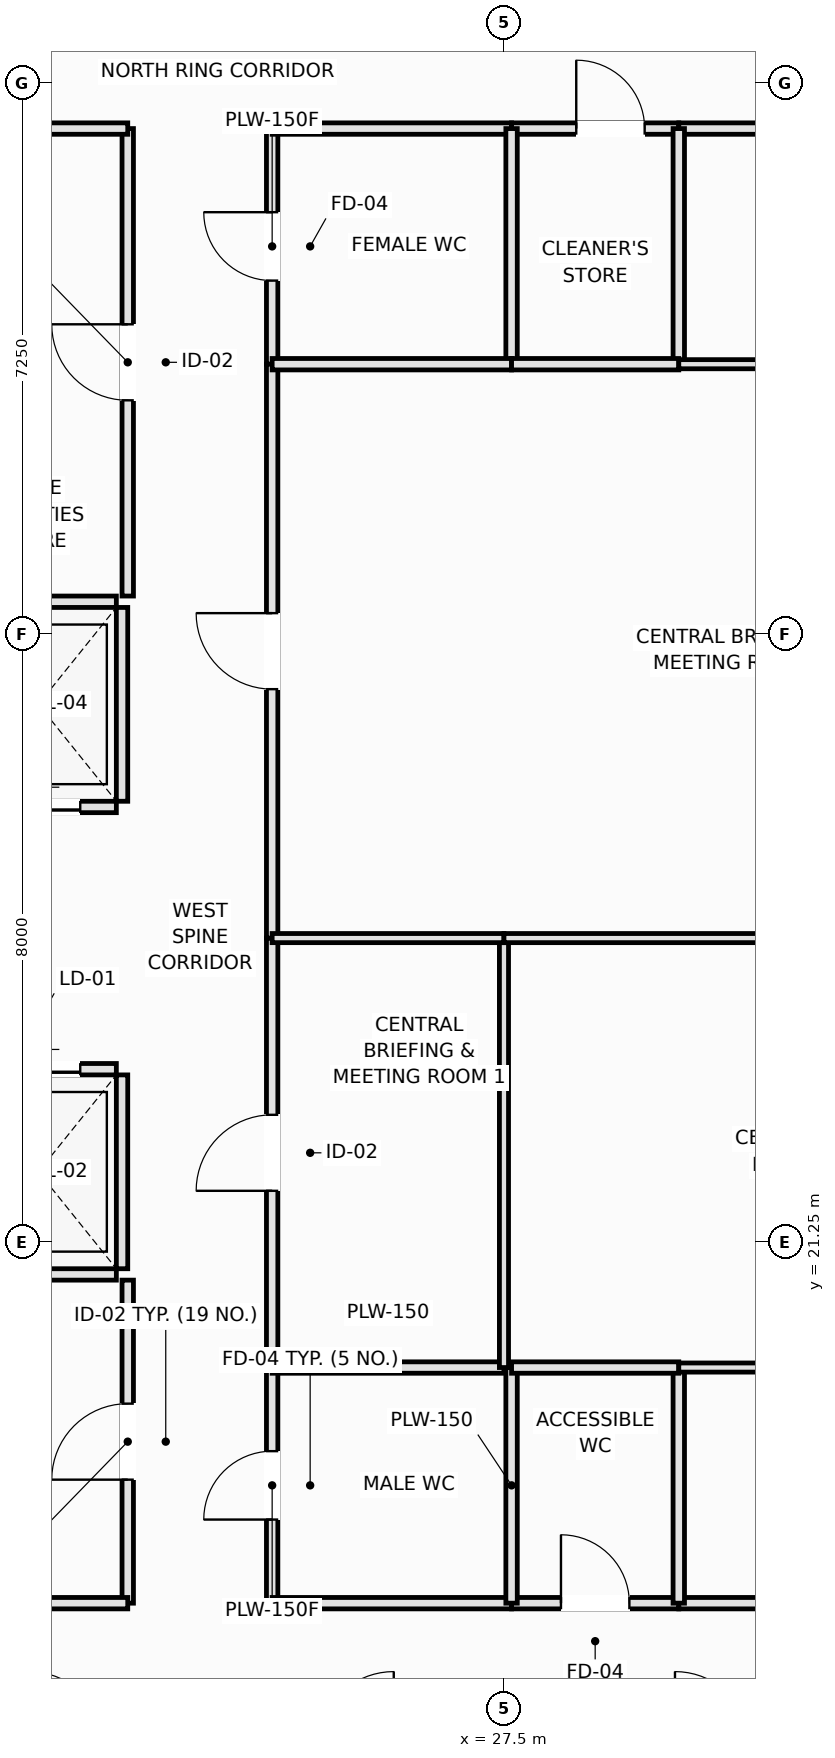
"""IFC4 building model, lengths in metres.
Left out: names, types, materials, properties, quantities, classifications, styles, units other than length and angle.
Written with IfcOpenShell. Run it as: python <this file> out.ifc"""

import sys

from ifc_helpers import new_model, si_unit, direction, frame, frame_2d, origin, place, context, subcontext, project, spatial, rectangle, extrude, element, fill, save


model = new_model("IFC4")
c1 = context("Model", 3, precision=1e-05, world=origin(), true_north=direction((0.0, 1.0)))
c2 = subcontext(c1, "Body", "Model", "MODEL_VIEW")
j1 = project(units=[si_unit("LENGTHUNIT", "METRE"), si_unit("PLANEANGLEUNIT", "RADIAN")], contexts=[c1])
p1 = place(None, origin())
s1 = spatial("IfcSite", under=j1, at=p1, CompositionType="ELEMENT")
p2 = place(p1, origin())
s2 = spatial("IfcBuilding", under=s1, at=p2, CompositionType="ELEMENT")
p3 = place(p2, frame((0.0, 0.0, 64.65)))
s3 = spatial("IfcBuildingStorey", under=s2, at=p3, CompositionType="ELEMENT", Elevation=64.65)
p4 = place(p3, frame((20.35, 20.825, 0.0), z_axis=(0.0, 0.0, 1.0), x_axis=(1.0, 0.0, 0.0)))
e1 = element("IfcWall", 1, at=p4, inside=s3, PredefinedType="PARTITIONING", context=c2, shape_type="SweptSolid", body=[
    extrude(rectangle(XDim=2.05, YDim=0.15, at=frame_2d((1.025, 0.0))), origin(), (0.0, 0.0, 1.0), 3.37),
])
p5 = place(p3, frame((20.35, 23.525, 0.0), z_axis=(0.0, 0.0, 1.0), x_axis=(1.0, 0.0, 0.0)))
e2 = element("IfcWall", 2, at=p5, inside=s3, PredefinedType="PARTITIONING", context=c2, shape_type="SweptSolid", body=[
    extrude(rectangle(XDim=2.05, YDim=0.15, at=frame_2d((1.025, 0.0))), origin(), (0.0, 0.0, 1.0), 3.37),
])
p6 = place(p5, frame((0.475, 0.0, 0.0)))
e3 = element("IfcOpeningElement", 3, at=p6, cuts=e2, PredefinedType="OPENING", context=c2, shape_type="SweptSolid", body=[
    extrude(rectangle(XDim=1.1, YDim=2.2, at=frame_2d((0.55, 1.1))), frame((0.0, 0.085, 0.0), z_axis=(0.0, -1.0, 0.0), x_axis=(1.0, 0.0, 0.0)), (0.0, 0.0, 1.0), 0.17),
])
p7 = place(p3, frame((22.475, 20.9, 0.0), z_axis=(0.0, 0.0, 1.0), x_axis=(0.0, 1.0, 0.0)))
e4 = element("IfcWall", 4, at=p7, inside=s3, PredefinedType="PARTITIONING", context=c2, shape_type="SweptSolid", body=[
    extrude(rectangle(XDim=2.55, YDim=0.15, at=frame_2d((1.275, 0.0))), origin(), (0.0, 0.0, 1.0), 3.37),
])
p8 = place(p3, frame((20.35, 26.975, 0.0), z_axis=(0.0, 0.0, 1.0), x_axis=(1.0, 0.0, 0.0)))
e5 = element("IfcWall", 5, at=p8, inside=s3, PredefinedType="PARTITIONING", context=c2, shape_type="SweptSolid", body=[
    extrude(rectangle(XDim=2.05, YDim=0.15, at=frame_2d((1.025, 0.0))), origin(), (0.0, 0.0, 1.0), 3.37),
])
p9 = place(p8, frame((0.475, 0.0, 0.0)))
e6 = element("IfcOpeningElement", 6, at=p9, cuts=e5, PredefinedType="OPENING", context=c2, shape_type="SweptSolid", body=[
    extrude(rectangle(XDim=1.1, YDim=2.2, at=frame_2d((0.55, 1.1))), frame((0.0, 0.085, 0.0), z_axis=(0.0, -1.0, 0.0), x_axis=(1.0, 0.0, 0.0)), (0.0, 0.0, 1.0), 0.17),
])
p10 = place(p3, frame((20.35, 29.675, 0.0), z_axis=(0.0, 0.0, 1.0), x_axis=(1.0, 0.0, 0.0)))
e7 = element("IfcWall", 7, at=p10, inside=s3, PredefinedType="PARTITIONING", context=c2, shape_type="SweptSolid", body=[
    extrude(rectangle(XDim=2.05, YDim=0.15, at=frame_2d((1.025, 0.0))), origin(), (0.0, 0.0, 1.0), 3.37),
])
p11 = place(p3, frame((22.475, 27.05, 0.0), z_axis=(0.0, 0.0, 1.0), x_axis=(0.0, 1.0, 0.0)))
e8 = element("IfcWall", 8, at=p11, inside=s3, PredefinedType="PARTITIONING", context=c2, shape_type="SweptSolid", body=[
    extrude(rectangle(XDim=2.55, YDim=0.15, at=frame_2d((1.275, 0.0))), origin(), (0.0, 0.0, 1.0), 3.37),
])
p12 = place(p3, frame((22.55, 16.5, 0.0), z_axis=(0.0, 0.0, 1.0), x_axis=(0.0, 1.0, 0.0)))
e9 = element("IfcWall", 9, at=p12, inside=s3, PredefinedType="PARTITIONING", context=c2, shape_type="SweptSolid", body=[
    extrude(rectangle(XDim=4.25, YDim=0.15, at=frame_2d((2.125, 0.0))), origin(), (0.0, 0.0, 1.0), 3.01),
])
p13 = place(p12, frame((1.625, 0.0, 0.0)))
e10 = element("IfcOpeningElement", 10, at=p13, cuts=e9, PredefinedType="OPENING", context=c2, shape_type="SweptSolid", body=[
    extrude(rectangle(XDim=1.0, YDim=2.15, at=frame_2d((0.5, 1.075))), frame((0.0, 0.085, 0.0), z_axis=(0.0, -1.0, 0.0), x_axis=(1.0, 0.0, 0.0)), (0.0, 0.0, 1.0), 0.17),
])
p14 = place(p3, frame((22.55, 29.75, 0.0), z_axis=(0.0, 0.0, 1.0), x_axis=(0.0, 1.0, 0.0)))
e11 = element("IfcWall", 11, at=p14, inside=s3, PredefinedType="PARTITIONING", context=c2, shape_type="SweptSolid", body=[
    extrude(rectangle(XDim=6.15, YDim=0.15, at=frame_2d((3.075, 0.0))), origin(), (0.0, 0.0, 1.0), 3.01),
])
p15 = place(p14, frame((2.575, 0.0, 0.0)))
e12 = element("IfcOpeningElement", 12, at=p15, cuts=e11, PredefinedType="OPENING", context=c2, shape_type="SweptSolid", body=[
    extrude(rectangle(XDim=1.0, YDim=2.15, at=frame_2d((0.5, 1.075))), frame((0.0, 0.085, 0.0), z_axis=(0.0, -1.0, 0.0), x_axis=(1.0, 0.0, 0.0)), (0.0, 0.0, 1.0), 0.17),
])
p16 = place(p3, frame((24.45, 16.5, 0.0), z_axis=(0.0, 0.0, 1.0), x_axis=(0.0, 1.0, 0.0)))
e13 = element("IfcWall", 13, at=p16, inside=s3, PredefinedType="PLUMBINGWALL", context=c2, shape_type="SweptSolid", body=[
    extrude(rectangle(XDim=3.1, YDim=0.15, at=frame_2d((1.55, 0.0))), origin(), (0.0, 0.0, 1.0), 3.37),
])
p17 = place(p16, frame((1.1, 0.0, 0.0)))
e14 = element("IfcOpeningElement", 14, at=p17, cuts=e13, PredefinedType="OPENING", context=c2, shape_type="SweptSolid", body=[
    extrude(rectangle(XDim=0.9, YDim=2.1, at=frame_2d((0.45, 1.05))), frame((0.0, 0.085, 0.0), z_axis=(0.0, -1.0, 0.0), x_axis=(1.0, 0.0, 0.0)), (0.0, 0.0, 1.0), 0.17),
])
p18 = place(p3, frame((24.45, 32.8, 0.0), z_axis=(0.0, 0.0, 1.0), x_axis=(0.0, 1.0, 0.0)))
e15 = element("IfcWall", 15, at=p18, inside=s3, PredefinedType="PLUMBINGWALL", context=c2, shape_type="SweptSolid", body=[
    extrude(rectangle(XDim=3.1, YDim=0.15, at=frame_2d((1.55, 0.0))), origin(), (0.0, 0.0, 1.0), 3.37),
])
p19 = place(p18, frame((1.1, 0.0, 0.0)))
e16 = element("IfcOpeningElement", 16, at=p19, cuts=e15, PredefinedType="OPENING", context=c2, shape_type="SweptSolid", body=[
    extrude(rectangle(XDim=0.9, YDim=2.1, at=frame_2d((0.45, 1.05))), frame((0.0, 0.085, 0.0), z_axis=(0.0, -1.0, 0.0), x_axis=(1.0, 0.0, 0.0)), (0.0, 0.0, 1.0), 0.17),
])
p20 = place(p3, frame((24.45, 19.6, 0.0), z_axis=(0.0, 0.0, 1.0), x_axis=(0.0, 1.0, 0.0)))
e17 = element("IfcWall", 17, at=p20, inside=s3, PredefinedType="PARTITIONING", context=c2, shape_type="SweptSolid", body=[
    extrude(rectangle(XDim=5.65, YDim=0.15, at=frame_2d((2.825, 0.0))), origin(), (0.0, 0.0, 1.0), 3.37),
])
p21 = place(p20, frame((2.325, 0.0, 0.0)))
e18 = element("IfcOpeningElement", 18, at=p21, cuts=e17, PredefinedType="OPENING", context=c2, shape_type="SweptSolid", body=[
    extrude(rectangle(XDim=1.0, YDim=2.15, at=frame_2d((0.5, 1.075))), frame((0.0, 0.085, 0.0), z_axis=(0.0, -1.0, 0.0), x_axis=(1.0, 0.0, 0.0)), (0.0, 0.0, 1.0), 0.17),
])
p22 = place(p3, frame((24.45, 25.25, 0.0), z_axis=(0.0, 0.0, 1.0), x_axis=(0.0, 1.0, 0.0)))
e19 = element("IfcWall", 19, at=p22, inside=s3, PredefinedType="PARTITIONING", context=c2, shape_type="SweptSolid", body=[
    extrude(rectangle(XDim=7.55, YDim=0.15, at=frame_2d((3.775, 0.0))), origin(), (0.0, 0.0, 1.0), 3.37),
])
p23 = place(p22, frame((3.275, 0.0, 0.0)))
e20 = element("IfcOpeningElement", 20, at=p23, cuts=e19, PredefinedType="OPENING", context=c2, shape_type="SweptSolid", body=[
    extrude(rectangle(XDim=1.0, YDim=2.15, at=frame_2d((0.5, 1.075))), frame((0.0, 0.085, 0.0), z_axis=(0.0, -1.0, 0.0), x_axis=(1.0, 0.0, 0.0)), (0.0, 0.0, 1.0), 0.17),
])
p24 = place(p3, frame((19.9, 16.5, 0.0), z_axis=(0.0, 0.0, 1.0), x_axis=(1.0, 0.0, 0.0)))
e21 = element("IfcWall", 21, at=p24, inside=s3, PredefinedType="PARTITIONING", context=c2, shape_type="SweptSolid", body=[
    extrude(rectangle(XDim=2.65, YDim=0.15, at=frame_2d((1.325, 0.0))), origin(), (0.0, 0.0, 1.0), 3.37),
])
p25 = place(p3, frame((24.45, 16.5, 0.0), z_axis=(0.0, 0.0, 1.0), x_axis=(1.0, 0.0, 0.0)))
e22 = element("IfcWall", 22, at=p25, inside=s3, PredefinedType="PLUMBINGWALL", context=c2, shape_type="SweptSolid", body=[
    extrude(rectangle(XDim=3.15, YDim=0.15, at=frame_2d((1.575, 0.0))), origin(), (0.0, 0.0, 1.0), 3.37),
])
p26 = place(p3, frame((27.6, 16.5, 0.0), z_axis=(0.0, 0.0, 1.0), x_axis=(1.0, 0.0, 0.0)))
e23 = element("IfcWall", 23, at=p26, inside=s3, PredefinedType="PLUMBINGWALL", context=c2, shape_type="SweptSolid", body=[
    extrude(rectangle(XDim=2.2, YDim=0.15, at=frame_2d((1.1, 0.0))), origin(), (0.0, 0.0, 1.0), 3.37),
])
p27 = place(p26, frame((0.65, 0.0, 0.0)))
e24 = element("IfcOpeningElement", 24, at=p27, cuts=e23, PredefinedType="OPENING", context=c2, shape_type="SweptSolid", body=[
    extrude(rectangle(XDim=0.9, YDim=2.1, at=frame_2d((0.45, 1.05))), frame((0.0, 0.085, 0.0), z_axis=(0.0, -1.0, 0.0), x_axis=(1.0, 0.0, 0.0)), (0.0, 0.0, 1.0), 0.17),
])
p28 = place(p3, frame((29.8, 16.5, 0.0), z_axis=(0.0, 0.0, 1.0), x_axis=(1.0, 0.0, 0.0)))
e25 = element("IfcWall", 25, at=p28, inside=s3, PredefinedType="PARTITIONING", context=c2, shape_type="SweptSolid", body=[
    extrude(rectangle(XDim=6.5, YDim=0.15, at=frame_2d((3.25, 0.0))), origin(), (0.0, 0.0, 1.0), 3.37),
])
p29 = place(p3, frame((19.9, 35.9, 0.0), z_axis=(0.0, 0.0, 1.0), x_axis=(1.0, 0.0, 0.0)))
e26 = element("IfcWall", 26, at=p29, inside=s3, PredefinedType="PARTITIONING", context=c2, shape_type="SweptSolid", body=[
    extrude(rectangle(XDim=2.65, YDim=0.15, at=frame_2d((1.325, 0.0))), origin(), (0.0, 0.0, 1.0), 3.37),
])
p30 = place(p3, frame((24.45, 35.9, 0.0), z_axis=(0.0, 0.0, 1.0), x_axis=(1.0, 0.0, 0.0)))
e27 = element("IfcWall", 27, at=p30, inside=s3, PredefinedType="PLUMBINGWALL", context=c2, shape_type="SweptSolid", body=[
    extrude(rectangle(XDim=3.15, YDim=0.15, at=frame_2d((1.575, 0.0))), origin(), (0.0, 0.0, 1.0), 3.37),
])
p31 = place(p3, frame((27.6, 35.9, 0.0), z_axis=(0.0, 0.0, 1.0), x_axis=(1.0, 0.0, 0.0)))
e28 = element("IfcWall", 28, at=p31, inside=s3, PredefinedType="PLUMBINGWALL", context=c2, shape_type="SweptSolid", body=[
    extrude(rectangle(XDim=2.2, YDim=0.15, at=frame_2d((1.1, 0.0))), origin(), (0.0, 0.0, 1.0), 3.37),
])
p32 = place(p31, frame((0.851, 0.0, 0.0)))
e29 = element("IfcOpeningElement", 29, at=p32, cuts=e28, PredefinedType="OPENING", context=c2, shape_type="SweptSolid", body=[
    extrude(rectangle(XDim=0.9, YDim=2.1, at=frame_2d((0.45, 1.05))), frame((0.0, 0.085, 0.0), z_axis=(0.0, -1.0, 0.0), x_axis=(1.0, 0.0, 0.0)), (0.0, 0.0, 1.0), 0.17),
])
p33 = place(p3, frame((29.8, 35.9, 0.0), z_axis=(0.0, 0.0, 1.0), x_axis=(1.0, 0.0, 0.0)))
e30 = element("IfcWall", 30, at=p33, inside=s3, PredefinedType="PARTITIONING", context=c2, shape_type="SweptSolid", body=[
    extrude(rectangle(XDim=6.5, YDim=0.15, at=frame_2d((3.25, 0.0))), origin(), (0.0, 0.0, 1.0), 3.37),
])
p34 = place(p3, frame((27.6, 16.5, 0.0), z_axis=(0.0, 0.0, 1.0), x_axis=(0.0, 1.0, 0.0)))
e31 = element("IfcWall", 31, at=p34, inside=s3, PredefinedType="PLUMBINGWALL", context=c2, shape_type="SweptSolid", body=[
    extrude(rectangle(XDim=3.1, YDim=0.15, at=frame_2d((1.55, 0.0))), origin(), (0.0, 0.0, 1.0), 3.37),
])
p35 = place(p3, frame((24.45, 19.6, 0.0), z_axis=(0.0, 0.0, 1.0), x_axis=(1.0, 0.0, 0.0)))
e32 = element("IfcWall", 32, at=p35, inside=s3, PredefinedType="PLUMBINGWALL", context=c2, shape_type="SweptSolid", body=[
    extrude(rectangle(XDim=3.05, YDim=0.15, at=frame_2d((1.525, 0.0))), origin(), (0.0, 0.0, 1.0), 3.37),
])
p36 = place(p3, frame((27.6, 32.8, 0.0), z_axis=(0.0, 0.0, 1.0), x_axis=(0.0, 1.0, 0.0)))
e33 = element("IfcWall", 33, at=p36, inside=s3, PredefinedType="PLUMBINGWALL", context=c2, shape_type="SweptSolid", body=[
    extrude(rectangle(XDim=3.1, YDim=0.15, at=frame_2d((1.55, 0.0))), origin(), (0.0, 0.0, 1.0), 3.37),
])
p37 = place(p3, frame((24.45, 32.8, 0.0), z_axis=(0.0, 0.0, 1.0), x_axis=(1.0, 0.0, 0.0)))
e34 = element("IfcWall", 34, at=p37, inside=s3, PredefinedType="PLUMBINGWALL", context=c2, shape_type="SweptSolid", body=[
    extrude(rectangle(XDim=3.15, YDim=0.15, at=frame_2d((1.575, 0.0))), origin(), (0.0, 0.0, 1.0), 3.37),
])
p38 = place(p3, frame((29.8, 16.5, 0.0), z_axis=(0.0, 0.0, 1.0), x_axis=(0.0, 1.0, 0.0)))
e35 = element("IfcWall", 35, at=p38, inside=s3, PredefinedType="PLUMBINGWALL", context=c2, shape_type="SweptSolid", body=[
    extrude(rectangle(XDim=3.1, YDim=0.15, at=frame_2d((1.55, 0.0))), origin(), (0.0, 0.0, 1.0), 3.37),
])
p39 = place(p3, frame((27.6, 19.6, 0.0), z_axis=(0.0, 0.0, 1.0), x_axis=(1.0, 0.0, 0.0)))
e36 = element("IfcWall", 36, at=p39, inside=s3, PredefinedType="PLUMBINGWALL", context=c2, shape_type="SweptSolid", body=[
    extrude(rectangle(XDim=2.2, YDim=0.15, at=frame_2d((1.1, 0.0))), origin(), (0.0, 0.0, 1.0), 3.37),
])
p40 = place(p3, frame((29.8, 32.8, 0.0), z_axis=(0.0, 0.0, 1.0), x_axis=(0.0, 1.0, 0.0)))
e37 = element("IfcWall", 37, at=p40, inside=s3, PredefinedType="PLUMBINGWALL", context=c2, shape_type="SweptSolid", body=[
    extrude(rectangle(XDim=3.1, YDim=0.15, at=frame_2d((1.55, 0.0))), origin(), (0.0, 0.0, 1.0), 3.37),
])
p41 = place(p3, frame((27.6, 32.8, 0.0), z_axis=(0.0, 0.0, 1.0), x_axis=(1.0, 0.0, 0.0)))
e38 = element("IfcWall", 38, at=p41, inside=s3, PredefinedType="PLUMBINGWALL", context=c2, shape_type="SweptSolid", body=[
    extrude(rectangle(XDim=2.2, YDim=0.15, at=frame_2d((1.1, 0.0))), origin(), (0.0, 0.0, 1.0), 3.37),
])
for number, where, z_axis, x_axis in (
    (39, (29.8, 19.6, 0.0), (0.0, 0.0, 1.0), (1.0, 0.0, 0.0)),
    (40, (29.8, 32.8, 0.0), (0.0, 0.0, 1.0), (1.0, 0.0, 0.0)),
):
    element("IfcWall", number, at=place(p3, frame(where, z_axis=z_axis, x_axis=x_axis)), inside=s3, PredefinedType="PARTITIONING", context=c2, shape_type="SweptSolid", body=[
        extrude(rectangle(XDim=6.5, YDim=0.12, at=frame_2d((3.25, 0.0))), origin(), (0.0, 0.0, 1.0), 3.37),
    ])
p42 = place(p3, frame((27.5, 19.6, 0.0), z_axis=(0.0, 0.0, 1.0), x_axis=(0.0, 1.0, 0.0)))
e41 = element("IfcWall", 41, at=p42, inside=s3, PredefinedType="PARTITIONING", context=c2, shape_type="SweptSolid", body=[
    extrude(rectangle(XDim=5.65, YDim=0.12, at=frame_2d((2.825, 0.0))), origin(), (0.0, 0.0, 1.0), 3.37),
])
p43 = place(p3, frame((24.45, 25.25, 0.0), z_axis=(0.0, 0.0, 1.0), x_axis=(1.0, 0.0, 0.0)))
e42 = element("IfcWall", 42, at=p43, inside=s3, PredefinedType="PARTITIONING", context=c2, shape_type="SweptSolid", body=[
    extrude(rectangle(XDim=3.05, YDim=0.12, at=frame_2d((1.525, 0.0))), origin(), (0.0, 0.0, 1.0), 2.72),
])
p44 = place(p3, frame((27.5, 25.25, 0.0), z_axis=(0.0, 0.0, 1.0), x_axis=(1.0, 0.0, 0.0)))
e43 = element("IfcWall", 43, at=p44, inside=s3, PredefinedType="PARTITIONING", context=c2, shape_type="SweptSolid", body=[
    extrude(rectangle(XDim=8.8, YDim=0.12, at=frame_2d((4.4, 0.0))), origin(), (0.0, 0.0, 1.0), 2.72),
])
p45 = place(p6, origin())
e44 = element("IfcDoor", 44, at=p45, inside=s3, OperationType="DOUBLE_DOOR_SLIDING", PredefinedType="DOOR", context=c2, shape_type="SweptSolid", body=[
    extrude(rectangle(XDim=1.1, YDim=2.2, at=frame_2d((0.55, 1.1))), frame((0.0, 0.025, 0.0), z_axis=(0.0, -1.0, 0.0), x_axis=(1.0, 0.0, 0.0)), (0.0, 0.0, 1.0), 0.05),
])
fill(e3, e44)
p46 = place(p9, origin())
e45 = element("IfcDoor", 45, at=p46, inside=s3, OperationType="DOUBLE_DOOR_SLIDING", PredefinedType="DOOR", context=c2, shape_type="SweptSolid", body=[
    extrude(rectangle(XDim=1.1, YDim=2.2, at=frame_2d((0.55, 1.1))), frame((0.0, 0.025, 0.0), z_axis=(0.0, -1.0, 0.0), x_axis=(1.0, 0.0, 0.0)), (0.0, 0.0, 1.0), 0.05),
])
fill(e6, e45)
p47 = place(p13, origin())
e46 = element("IfcDoor", 46, at=p47, inside=s3, OperationType="SINGLE_SWING_LEFT", PredefinedType="DOOR", context=c2, shape_type="SweptSolid", body=[
    extrude(rectangle(XDim=1.0, YDim=2.15, at=frame_2d((0.5, 1.075))), frame((0.0, 0.025, 0.0), z_axis=(0.0, -1.0, 0.0), x_axis=(1.0, 0.0, 0.0)), (0.0, 0.0, 1.0), 0.05),
])
fill(e10, e46)
p48 = place(p15, origin())
e47 = element("IfcDoor", 47, at=p48, inside=s3, OperationType="SINGLE_SWING_RIGHT", PredefinedType="DOOR", context=c2, shape_type="SweptSolid", body=[
    extrude(rectangle(XDim=1.0, YDim=2.15, at=frame_2d((0.5, 1.075))), frame((0.0, 0.025, 0.0), z_axis=(0.0, -1.0, 0.0), x_axis=(1.0, 0.0, 0.0)), (0.0, 0.0, 1.0), 0.05),
])
fill(e12, e47)
p49 = place(p17, origin())
e48 = element("IfcDoor", 48, at=p49, inside=s3, OperationType="SINGLE_SWING_LEFT", PredefinedType="DOOR", context=c2, shape_type="SweptSolid", body=[
    extrude(rectangle(XDim=0.9, YDim=2.1, at=frame_2d((0.45, 1.05))), frame((0.0, 0.025, 0.0), z_axis=(0.0, -1.0, 0.0), x_axis=(1.0, 0.0, 0.0)), (0.0, 0.0, 1.0), 0.05),
])
fill(e14, e48)
p50 = place(p19, origin())
e49 = element("IfcDoor", 49, at=p50, inside=s3, OperationType="SINGLE_SWING_RIGHT", PredefinedType="DOOR", context=c2, shape_type="SweptSolid", body=[
    extrude(rectangle(XDim=0.9, YDim=2.1, at=frame_2d((0.45, 1.05))), frame((0.0, 0.025, 0.0), z_axis=(0.0, -1.0, 0.0), x_axis=(1.0, 0.0, 0.0)), (0.0, 0.0, 1.0), 0.05),
])
fill(e16, e49)
p51 = place(p21, origin())
e50 = element("IfcDoor", 50, at=p51, inside=s3, OperationType="SINGLE_SWING_LEFT", PredefinedType="DOOR", context=c2, shape_type="SweptSolid", body=[
    extrude(rectangle(XDim=1.0, YDim=2.15, at=frame_2d((0.5, 1.075))), frame((0.0, 0.025, 0.0), z_axis=(0.0, -1.0, 0.0), x_axis=(1.0, 0.0, 0.0)), (0.0, 0.0, 1.0), 0.05),
])
fill(e18, e50)
p52 = place(p23, origin())
e51 = element("IfcDoor", 51, at=p52, inside=s3, OperationType="SINGLE_SWING_RIGHT", PredefinedType="DOOR", context=c2, shape_type="SweptSolid", body=[
    extrude(rectangle(XDim=1.0, YDim=2.15, at=frame_2d((0.5, 1.075))), frame((0.0, 0.025, 0.0), z_axis=(0.0, -1.0, 0.0), x_axis=(1.0, 0.0, 0.0)), (0.0, 0.0, 1.0), 0.05),
])
fill(e20, e51)
p53 = place(p27, origin())
e52 = element("IfcDoor", 52, at=p53, inside=s3, OperationType="SINGLE_SWING_LEFT", PredefinedType="DOOR", context=c2, shape_type="SweptSolid", body=[
    extrude(rectangle(XDim=0.9, YDim=2.1, at=frame_2d((0.45, 1.05))), frame((0.0, 0.025, 0.0), z_axis=(0.0, -1.0, 0.0), x_axis=(1.0, 0.0, 0.0)), (0.0, 0.0, 1.0), 0.05),
])
fill(e24, e52)
p54 = place(p32, origin())
e53 = element("IfcDoor", 53, at=p54, inside=s3, OperationType="SINGLE_SWING_LEFT", PredefinedType="DOOR", context=c2, shape_type="SweptSolid", body=[
    extrude(rectangle(XDim=0.9, YDim=2.1, at=frame_2d((0.45, 1.05))), frame((0.0, 0.025, 0.0), z_axis=(0.0, -1.0, 0.0), x_axis=(1.0, 0.0, 0.0)), (0.0, 0.0, 1.0), 0.05),
])
fill(e29, e53)
save(model, sys.argv[1])
